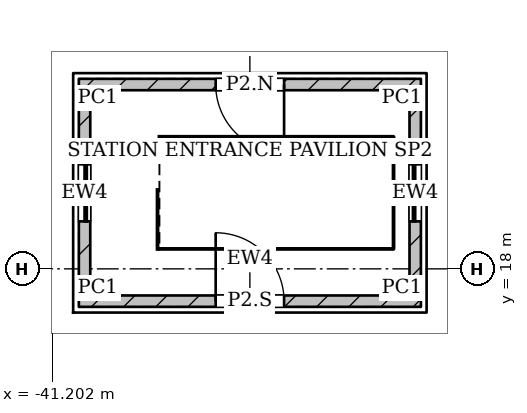
"""IFC4 building model, lengths in metres.
Left out: names, types, materials, properties, quantities, classifications, styles, units other than length and angle.
Written with IfcOpenShell. Run it as: python <this file> out.ifc"""

import sys

from ifc_helpers import new_model, si_unit, direction, frame, frame_2d, origin, origin_2d, place, context, subcontext, project, spatial, rectangle, extrude, element, fill, save


model = new_model("IFC4")
c1 = context("Model", 3, precision=1e-05, world=origin(), true_north=direction((0.0, 1.0)))
c2 = subcontext(c1, "Body", "Model", "MODEL_VIEW")
j1 = project(units=[si_unit("LENGTHUNIT", "METRE"), si_unit("PLANEANGLEUNIT", "RADIAN")], contexts=[c1])
p1 = place(None, origin())
s1 = spatial("IfcSite", under=j1, at=p1, CompositionType="ELEMENT")
p2 = place(p1, origin())
s2 = spatial("IfcBuilding", under=s1, at=p2, CompositionType="ELEMENT")
p3 = place(p2, origin())
s3 = spatial("IfcBuildingStorey", under=s2, at=p3, CompositionType="ELEMENT", Elevation=0.0)
p4 = place(p3, frame((-40.5, 17.15, 0.0), z_axis=(0.0, 0.0, 1.0), x_axis=(1.0, 0.0, 0.0)))
e1 = element("IfcWall", 1, at=p4, inside=s3, PredefinedType="SOLIDWALL", context=c2, shape_type="SweptSolid", body=[
    extrude(rectangle(XDim=9.0, YDim=0.3, at=frame_2d((4.5, 0.0))), origin(), (0.0, 0.0, 1.0), 4.2),
])
p5 = place(p4, frame((3.6, 0.0, 0.0)))
e2 = element("IfcOpeningElement", 2, at=p5, cuts=e1, PredefinedType="OPENING", context=c2, shape_type="SweptSolid", body=[
    extrude(rectangle(XDim=1.8, YDim=2.4, at=frame_2d((0.9, 1.2))), frame((0.0, 0.16, 0.0), z_axis=(0.0, -1.0, 0.0), x_axis=(1.0, 0.0, 0.0)), (0.0, 0.0, 1.0), 0.32),
])
p6 = place(p3, frame((-31.65, 17.3, 0.0), z_axis=(0.0, 0.0, 1.0), x_axis=(0.0, 1.0, 0.0)))
e3 = element("IfcWall", 3, at=p6, inside=s3, PredefinedType="SOLIDWALL", context=c2, shape_type="SweptSolid", body=[
    extrude(rectangle(XDim=5.4, YDim=0.3, at=frame_2d((2.7, 0.0))), origin(), (0.0, 0.0, 1.0), 4.2),
])
p7 = place(p6, frame((1.95, 0.0, 0.9)))
e4 = element("IfcOpeningElement", 4, at=p7, cuts=e3, PredefinedType="OPENING", context=c2, shape_type="SweptSolid", body=[
    extrude(rectangle(XDim=1.5, YDim=1.8, at=frame_2d((0.75, 0.9))), frame((0.0, 0.16, 0.0), z_axis=(0.0, -1.0, 0.0), x_axis=(1.0, 0.0, 0.0)), (0.0, 0.0, 1.0), 0.32),
])
p8 = place(p3, frame((-31.5, 22.85, 0.0), z_axis=(0.0, 0.0, 1.0), x_axis=(-1.0, 0.0, 0.0)))
e5 = element("IfcWall", 5, at=p8, inside=s3, PredefinedType="SOLIDWALL", context=c2, shape_type="SweptSolid", body=[
    extrude(rectangle(XDim=9.0, YDim=0.3, at=frame_2d((4.5, 0.0))), origin(), (0.0, 0.0, 1.0), 4.2),
])
p9 = place(p8, frame((3.6, 0.0, 0.0)))
e6 = element("IfcOpeningElement", 6, at=p9, cuts=e5, PredefinedType="OPENING", context=c2, shape_type="SweptSolid", body=[
    extrude(rectangle(XDim=1.8, YDim=2.4, at=frame_2d((0.9, 1.2))), frame((0.0, 0.16, 0.0), z_axis=(0.0, -1.0, 0.0), x_axis=(1.0, 0.0, 0.0)), (0.0, 0.0, 1.0), 0.32),
])
p10 = place(p3, frame((-40.35, 22.7, 0.0), z_axis=(0.0, 0.0, 1.0), x_axis=(0.0, -1.0, 0.0)))
e7 = element("IfcWall", 7, at=p10, inside=s3, PredefinedType="SOLIDWALL", context=c2, shape_type="SweptSolid", body=[
    extrude(rectangle(XDim=5.4, YDim=0.3, at=frame_2d((2.7, 0.0))), origin(), (0.0, 0.0, 1.0), 4.2),
])
p11 = place(p10, frame((1.95, 0.0, 0.9)))
e8 = element("IfcOpeningElement", 8, at=p11, cuts=e7, PredefinedType="OPENING", context=c2, shape_type="SweptSolid", body=[
    extrude(rectangle(XDim=1.5, YDim=1.8, at=frame_2d((0.75, 0.9))), frame((0.0, 0.16, 0.0), z_axis=(0.0, -1.0, 0.0), x_axis=(1.0, 0.0, 0.0)), (0.0, 0.0, 1.0), 0.32),
])
for number, where, z_axis, x_axis in (
    (9, (-40.0, 17.5, 0.0), (0.0, 0.0, 1.0), (1.0, 0.0, 0.0)),
    (10, (-32.0, 17.5, 0.0), (0.0, 0.0, 1.0), (1.0, 0.0, 0.0)),
    (11, (-32.0, 22.5, 0.0), (0.0, 0.0, 1.0), (1.0, 0.0, 0.0)),
    (12, (-40.0, 22.5, 0.0), (0.0, 0.0, 1.0), (1.0, 0.0, 0.0)),
):
    element("IfcColumn", number, at=place(p3, frame(where, z_axis=z_axis, x_axis=x_axis)), inside=s3, PredefinedType="COLUMN", context=c2, shape_type="SweptSolid", body=[
        extrude(rectangle(XDim=0.4, YDim=0.4, at=origin_2d()), origin(), (0.0, 0.0, 1.0), 4.2),
    ])
p12 = place(p5, origin())
e13 = element("IfcDoor", 13, at=p12, inside=s3, OperationType="DOUBLE_DOOR_DOUBLE_SWING", PredefinedType="DOOR", context=c2, shape_type="SweptSolid", body=[
    extrude(rectangle(XDim=1.8, YDim=2.4, at=frame_2d((0.9, 1.2))), frame((0.0, 0.025, 0.0), z_axis=(0.0, -1.0, 0.0), x_axis=(1.0, 0.0, 0.0)), (0.0, 0.0, 1.0), 0.05),
])
fill(e2, e13)
p13 = place(p7, origin())
e14 = element("IfcWindow", 14, at=p13, inside=s3, PartitioningType="SINGLE_PANEL", PredefinedType="WINDOW", context=c2, shape_type="SweptSolid", body=[
    extrude(rectangle(XDim=1.5, YDim=1.8, at=frame_2d((0.75, 0.9))), frame((0.0, 0.06, 0.0), z_axis=(0.0, -1.0, 0.0), x_axis=(1.0, 0.0, 0.0)), (0.0, 0.0, 1.0), 0.06),
])
fill(e4, e14)
p14 = place(p9, origin())
e15 = element("IfcDoor", 15, at=p14, inside=s3, OperationType="DOUBLE_DOOR_DOUBLE_SWING", PredefinedType="DOOR", context=c2, shape_type="SweptSolid", body=[
    extrude(rectangle(XDim=1.8, YDim=2.4, at=frame_2d((0.9, 1.2))), frame((0.0, 0.025, 0.0), z_axis=(0.0, -1.0, 0.0), x_axis=(1.0, 0.0, 0.0)), (0.0, 0.0, 1.0), 0.05),
])
fill(e6, e15)
p15 = place(p11, origin())
e16 = element("IfcWindow", 16, at=p15, inside=s3, PartitioningType="SINGLE_PANEL", PredefinedType="WINDOW", context=c2, shape_type="SweptSolid", body=[
    extrude(rectangle(XDim=1.5, YDim=1.8, at=frame_2d((0.75, 0.9))), frame((0.0, 0.06, 0.0), z_axis=(0.0, -1.0, 0.0), x_axis=(1.0, 0.0, 0.0)), (0.0, 0.0, 1.0), 0.06),
])
fill(e8, e16)
save(model, sys.argv[1])
